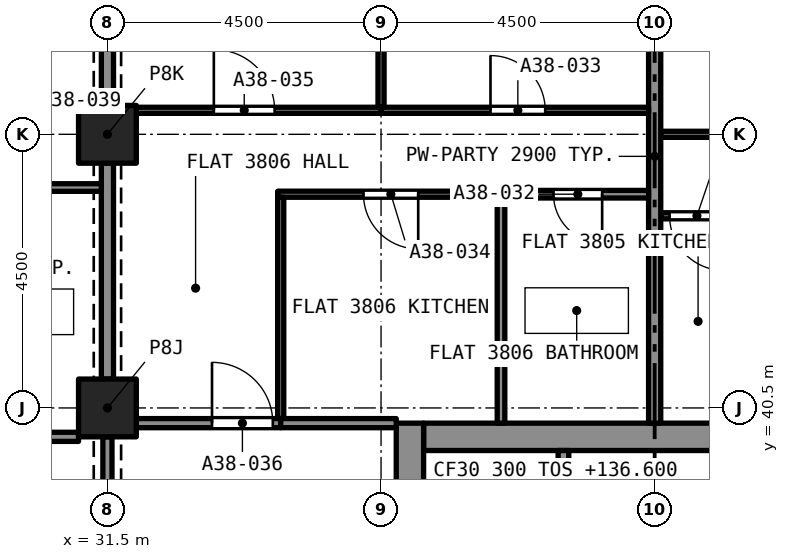
"""IFC4 building model, lengths in metres.
Left out: names, types, materials, properties, quantities, classifications, styles, units other than length and angle.
Written with IfcOpenShell. Run it as: python <this file> out.ifc"""

import sys

from ifc_helpers import new_model, si_unit, direction, frame, frame_2d, origin, origin_2d, place, context, subcontext, project, spatial, rectangle, extrude, element, fill, save


model = new_model("IFC4")
c1 = context("Model", 3, precision=1e-05, world=origin(), true_north=direction((0.0, 1.0)))
c2 = subcontext(c1, "Body", "Model", "MODEL_VIEW")
j1 = project(units=[si_unit("LENGTHUNIT", "METRE"), si_unit("PLANEANGLEUNIT", "RADIAN")], contexts=[c1])
p1 = place(None, origin())
s1 = spatial("IfcSite", under=j1, at=p1, CompositionType="ELEMENT")
p2 = place(p1, origin())
s2 = spatial("IfcBuilding", under=s1, at=p2, CompositionType="ELEMENT")
p3 = place(p2, frame((0.0, 0.0, 136.6)))
s3 = spatial("IfcBuildingStorey", under=s2, at=p3, CompositionType="ELEMENT", Elevation=136.6)
for number, where, z_axis, x_axis in (
    (1, (31.5, 40.5, 0.0), (0.0, 0.0, 1.0), (1.0, 0.0, 0.0)),
    (2, (31.5, 45.0, 0.0), (0.0, 0.0, 1.0), (1.0, 0.0, 0.0)),
):
    element("IfcColumn", number, at=place(p3, frame(where, z_axis=z_axis, x_axis=x_axis)), inside=s3, PredefinedType="COLUMN", context=c2, shape_type="SweptSolid", body=[
        extrude(rectangle(XDim=0.95, YDim=0.95, at=origin_2d()), origin(), (0.0, 0.0, 1.0), 3.2),
    ])
p4 = place(p3, frame((36.7, 40.025, 0.0), z_axis=(0.0, 0.0, 1.0), x_axis=(1.0, 0.0, 0.0)))
e3 = element("IfcWall", 3, at=p4, inside=s3, PredefinedType="SOLIDWALL", context=c2, shape_type="SweptSolid", body=[
    extrude(rectangle(XDim=7.6, YDim=0.45, at=frame_2d((3.8, 0.0))), origin(), (0.0, 0.0, 1.0), 3.2),
])
p5 = place(p3, frame((36.475, 27.25, 0.0), z_axis=(0.0, 0.0, 1.0), x_axis=(0.0, 1.0, 0.0)))
e4 = element("IfcWall", 4, at=p5, inside=s3, PredefinedType="SOLIDWALL", context=c2, shape_type="SweptSolid", body=[
    extrude(rectangle(XDim=13.0, YDim=0.45, at=frame_2d((6.5, 0.0))), origin(), (0.0, 0.0, 1.0), 3.2),
])
p6 = place(p5, frame((8.7, 0.0, 0.0)))
e5 = element("IfcOpeningElement", 5, at=p6, cuts=e4, PredefinedType="OPENING", context=c2, shape_type="SweptSolid", body=[
    extrude(rectangle(XDim=1.2, YDim=2.1, at=frame_2d((0.6, 1.05))), frame((0.0, 0.235, 0.0), z_axis=(0.0, -1.0, 0.0), x_axis=(1.0, 0.0, 0.0)), (0.0, 0.0, 1.0), 0.47),
])
p7 = place(p3, frame((40.6, 45.0, 0.0), z_axis=(0.0, 0.0, 1.0), x_axis=(1.0, 0.0, 0.0)))
e6 = element("IfcWall", 6, at=p7, inside=s3, PredefinedType="PARTITIONING", context=c2, shape_type="SweptSolid", body=[
    extrude(rectangle(XDim=4.4, YDim=0.1, at=frame_2d((2.2, 0.0))), origin(), (0.0, 0.0, 1.0), 2.9),
])
p8 = place(p7, frame((1.7, 0.0, 0.0)))
e7 = element("IfcOpeningElement", 7, at=p8, cuts=e6, PredefinedType="OPENING", context=c2, shape_type="SweptSolid", body=[
    extrude(rectangle(XDim=0.9, YDim=2.1, at=frame_2d((0.45, 1.05))), frame((0.0, 0.06, 0.0), z_axis=(0.0, -1.0, 0.0), x_axis=(1.0, 0.0, 0.0)), (0.0, 0.0, 1.0), 0.12),
])
p9 = place(p3, frame((41.891, 43.66, 0.0), z_axis=(0.0, 0.0, 1.0), x_axis=(-1.0, 0.0, 0.0)))
e8 = element("IfcWall", 8, at=p9, inside=s3, PredefinedType="PARTITIONING", context=c2, shape_type="SweptSolid", body=[
    extrude(rectangle(XDim=1.291, YDim=0.1, at=frame_2d((0.646, 0.0))), origin(), (0.0, 0.0, 1.0), 2.9),
])
p10 = place(p9, frame((0.246, 0.0, 0.0)))
e9 = element("IfcOpeningElement", 9, at=p10, cuts=e8, PredefinedType="OPENING", context=c2, shape_type="SweptSolid", body=[
    extrude(rectangle(XDim=0.9, YDim=2.1, at=frame_2d((0.45, 1.05))), frame((0.0, 0.06, 0.0), z_axis=(0.0, -1.0, 0.0), x_axis=(1.0, 0.0, 0.0)), (0.0, 0.0, 1.0), 0.12),
])
p11 = place(p3, frame((40.5, 40.25, 0.0), z_axis=(0.0, 0.0, 1.0), x_axis=(0.0, 1.0, 0.0)))
e10 = element("IfcWall", 10, at=p11, inside=s3, PredefinedType="PARTITIONING", context=c2, shape_type="SweptSolid", body=[
    extrude(rectangle(XDim=8.775, YDim=0.2, at=frame_2d((4.387, 0.0))), origin(), (0.0, 0.0, 1.0), 2.9),
])
p12 = place(p3, frame((40.4, 44.015, 0.0), z_axis=(0.0, 0.0, 1.0), x_axis=(-1.0, 0.0, 0.0)))
e11 = element("IfcWall", 11, at=p12, inside=s3, PredefinedType="PARTITIONING", context=c2, shape_type="SweptSolid", body=[
    extrude(rectangle(XDim=2.427, YDim=0.125, at=frame_2d((1.214, 0.0))), origin(), (0.0, 0.0, 1.0), 2.9),
])
p13 = place(p12, frame((0.764, 0.0, 0.0)))
e12 = element("IfcOpeningElement", 12, at=p13, cuts=e11, PredefinedType="OPENING", context=c2, shape_type="SweptSolid", body=[
    extrude(rectangle(XDim=0.8, YDim=2.1, at=frame_2d((0.4, 1.05))), frame((0.0, 0.073, 0.0), z_axis=(0.0, -1.0, 0.0), x_axis=(1.0, 0.0, 0.0)), (0.0, 0.0, 1.0), 0.145),
])
p14 = place(p3, frame((37.973, 40.25, 0.0), z_axis=(0.0, 0.0, 1.0), x_axis=(0.0, 1.0, 0.0)))
e13 = element("IfcWall", 13, at=p14, inside=s3, PredefinedType="PARTITIONING", context=c2, shape_type="SweptSolid", body=[
    extrude(rectangle(XDim=3.702, YDim=0.125, at=frame_2d((1.851, 0.0))), origin(), (0.0, 0.0, 1.0), 2.9),
])
p15 = place(p3, frame((36.0, 45.395, 0.0), z_axis=(0.0, 0.0, 1.0), x_axis=(1.0, 0.0, 0.0)))
e14 = element("IfcWall", 14, at=p15, inside=s3, PredefinedType="PARTITIONING", context=c2, shape_type="SweptSolid", body=[
    extrude(rectangle(XDim=4.4, YDim=0.1, at=frame_2d((2.2, 0.0))), origin(), (0.0, 0.0, 1.0), 2.9),
])
p16 = place(p15, frame((1.8, 0.0, 0.0)))
e15 = element("IfcOpeningElement", 15, at=p16, cuts=e14, PredefinedType="OPENING", context=c2, shape_type="SweptSolid", body=[
    extrude(rectangle(XDim=0.9, YDim=2.1, at=frame_2d((0.45, 1.05))), frame((0.0, 0.06, 0.0), z_axis=(0.0, -1.0, 0.0), x_axis=(1.0, 0.0, 0.0)), (0.0, 0.0, 1.0), 0.12),
])
p17 = place(p3, frame((36.0, 45.445, 0.0), z_axis=(0.0, 0.0, 1.0), x_axis=(0.0, 1.0, 0.0)))
e16 = element("IfcWall", 16, at=p17, inside=s3, PredefinedType="PARTITIONING", context=c2, shape_type="SweptSolid", body=[
    extrude(rectangle(XDim=3.58, YDim=0.1, at=frame_2d((1.79, 0.0))), origin(), (0.0, 0.0, 1.0), 2.9),
])
p18 = place(p3, frame((37.973, 44.015, 0.0), z_axis=(0.0, 0.0, 1.0), x_axis=(-1.0, 0.0, 0.0)))
e17 = element("IfcWall", 17, at=p18, inside=s3, PredefinedType="PARTITIONING", context=c2, shape_type="SweptSolid", body=[
    extrude(rectangle(XDim=3.673, YDim=0.1, at=frame_2d((1.836, 0.0))), origin(), (0.0, 0.0, 1.0), 2.9),
])
p19 = place(p18, frame((1.361, 0.0, 0.0)))
e18 = element("IfcOpeningElement", 18, at=p19, cuts=e17, PredefinedType="OPENING", context=c2, shape_type="SweptSolid", body=[
    extrude(rectangle(XDim=0.9, YDim=2.1, at=frame_2d((0.45, 1.05))), frame((0.0, 0.06, 0.0), z_axis=(0.0, -1.0, 0.0), x_axis=(1.0, 0.0, 0.0)), (0.0, 0.0, 1.0), 0.12),
])
p20 = place(p3, frame((34.35, 40.325, 0.0), z_axis=(0.0, 0.0, 1.0), x_axis=(0.0, 1.0, 0.0)))
e19 = element("IfcWall", 19, at=p20, inside=s3, PredefinedType="PARTITIONING", context=c2, shape_type="SweptSolid", body=[
    extrude(rectangle(XDim=3.64, YDim=0.1, at=frame_2d((1.82, 0.0))), origin(), (0.0, 0.0, 1.0), 2.9),
])
p21 = place(p3, frame((31.975, 45.395, 0.0), z_axis=(0.0, 0.0, 1.0), x_axis=(1.0, 0.0, 0.0)))
e20 = element("IfcWall", 20, at=p21, inside=s3, PredefinedType="PARTITIONING", context=c2, shape_type="SweptSolid", body=[
    extrude(rectangle(XDim=4.025, YDim=0.1, at=frame_2d((2.012, 0.0))), origin(), (0.0, 0.0, 1.0), 2.9),
])
p22 = place(p21, frame((1.275, 0.0, 0.0)))
e21 = element("IfcOpeningElement", 21, at=p22, cuts=e20, PredefinedType="OPENING", context=c2, shape_type="SweptSolid", body=[
    extrude(rectangle(XDim=1.0, YDim=2.1, at=frame_2d((0.5, 1.05))), frame((0.0, 0.06, 0.0), z_axis=(0.0, -1.0, 0.0), x_axis=(1.0, 0.0, 0.0)), (0.0, 0.0, 1.0), 0.12),
])
p23 = place(p3, frame((31.5, 40.975, 0.0), z_axis=(0.0, 0.0, 1.0), x_axis=(0.0, 1.0, 0.0)))
e22 = element("IfcWall", 22, at=p23, inside=s3, PredefinedType="PARTITIONING", context=c2, shape_type="SweptSolid", body=[
    extrude(rectangle(XDim=3.55, YDim=0.2, at=frame_2d((1.775, 0.0))), origin(), (0.0, 0.0, 1.0), 2.38),
])
p24 = place(p3, frame((31.975, 40.25, 0.0), z_axis=(0.0, 0.0, 1.0), x_axis=(1.0, 0.0, 0.0)))
e23 = element("IfcWall", 23, at=p24, inside=s3, PredefinedType="PARTITIONING", context=c2, shape_type="SweptSolid", body=[
    extrude(rectangle(XDim=2.375, YDim=0.15, at=frame_2d((1.188, 0.0))), origin(), (0.0, 0.0, 1.0), 2.9),
])
p25 = place(p24, frame((1.245, 0.0, 0.0)))
e24 = element("IfcOpeningElement", 24, at=p25, cuts=e23, PredefinedType="OPENING", context=c2, shape_type="SweptSolid", body=[
    extrude(rectangle(XDim=1.0, YDim=2.1, at=frame_2d((0.5, 1.05))), frame((0.0, 0.085, 0.0), z_axis=(0.0, -1.0, 0.0), x_axis=(1.0, 0.0, 0.0)), (0.0, 0.0, 1.0), 0.17),
])
p26 = place(p3, frame((34.35, 40.25, 0.0), z_axis=(0.0, 0.0, 1.0), x_axis=(1.0, 0.0, 0.0)))
e25 = element("IfcWall", 25, at=p26, inside=s3, PredefinedType="PARTITIONING", context=c2, shape_type="SweptSolid", body=[
    extrude(rectangle(XDim=1.9, YDim=0.15, at=frame_2d((0.95, 0.0))), origin(), (0.0, 0.0, 1.0), 2.9),
])
p27 = place(p3, frame((31.5, 45.495, 0.0), z_axis=(0.0, 0.0, 1.0), x_axis=(0.0, 1.0, 0.0)))
e26 = element("IfcWall", 26, at=p27, inside=s3, PredefinedType="PARTITIONING", context=c2, shape_type="SweptSolid", body=[
    extrude(rectangle(XDim=3.53, YDim=0.2, at=frame_2d((1.765, 0.0))), origin(), (0.0, 0.0, 1.0), 2.38),
])
p28 = place(p3, frame((31.4, 44.125, 0.0), z_axis=(0.0, 0.0, 1.0), x_axis=(-1.0, 0.0, 0.0)))
e27 = element("IfcWall", 27, at=p28, inside=s3, PredefinedType="PARTITIONING", context=c2, shape_type="SweptSolid", body=[
    extrude(rectangle(XDim=2.737, YDim=0.125, at=frame_2d((1.369, 0.0))), origin(), (0.0, 0.0, 1.0), 2.75),
])
p29 = place(p28, frame((0.887, 0.0, 0.0)))
e28 = element("IfcOpeningElement", 28, at=p29, cuts=e27, PredefinedType="OPENING", context=c2, shape_type="SweptSolid", body=[
    extrude(rectangle(XDim=0.8, YDim=2.1, at=frame_2d((0.4, 1.05))), frame((0.0, 0.073, 0.0), z_axis=(0.0, -1.0, 0.0), x_axis=(1.0, 0.0, 0.0)), (0.0, 0.0, 1.0), 0.145),
])
p30 = place(p3, frame((28.725, 40.025, 0.0), z_axis=(0.0, 0.0, 1.0), x_axis=(1.0, 0.0, 0.0)))
e29 = element("IfcWall", 29, at=p30, inside=s3, PredefinedType="PARTITIONING", context=c2, shape_type="SweptSolid", body=[
    extrude(rectangle(XDim=2.3, YDim=0.15, at=frame_2d((1.15, 0.0))), origin(), (0.0, 0.0, 1.0), 2.75),
])
p31 = place(p3, frame((27.0, 45.545, 0.0), z_axis=(0.0, 0.0, 1.0), x_axis=(1.0, 0.0, 0.0)))
e30 = element("IfcWall", 30, at=p31, inside=s3, PredefinedType="PARTITIONING", context=c2, shape_type="SweptSolid", body=[
    extrude(rectangle(XDim=4.4, YDim=0.1, at=frame_2d((2.2, 0.0))), origin(), (0.0, 0.0, 1.0), 2.75),
])
p32 = place(p31, frame((1.8, 0.0, 0.0)))
e31 = element("IfcOpeningElement", 31, at=p32, cuts=e30, PredefinedType="OPENING", context=c2, shape_type="SweptSolid", body=[
    extrude(rectangle(XDim=0.9, YDim=2.1, at=frame_2d((0.45, 1.05))), frame((0.0, 0.06, 0.0), z_axis=(0.0, -1.0, 0.0), x_axis=(1.0, 0.0, 0.0)), (0.0, 0.0, 1.0), 0.12),
])
p33 = place(p3, frame((31.5, 36.475, 0.0), z_axis=(0.0, 0.0, 1.0), x_axis=(0.0, 1.0, 0.0)))
e32 = element("IfcWall", 32, at=p33, inside=s3, PredefinedType="PARTITIONING", context=c2, shape_type="SweptSolid", body=[
    extrude(rectangle(XDim=3.55, YDim=0.15, at=frame_2d((1.775, 0.0))), origin(), (0.0, 0.0, 1.0), 2.38),
])
p34 = place(p33, frame((1.175, 0.0, 0.0)))
e33 = element("IfcOpeningElement", 33, at=p34, cuts=e32, PredefinedType="OPENING", context=c2, shape_type="SweptSolid", body=[
    extrude(rectangle(XDim=1.2, YDim=2.1, at=frame_2d((0.6, 1.05))), frame((0.0, 0.085, 0.0), z_axis=(0.0, -1.0, 0.0), x_axis=(1.0, 0.0, 0.0)), (0.0, 0.0, 1.0), 0.17),
])
p35 = place(p3, frame((39.0, 37.5, 0.0), z_axis=(0.0, 0.0, 1.0), x_axis=(0.0, 1.0, 0.0)))
e34 = element("IfcWall", 34, at=p35, inside=s3, PredefinedType="SOLIDWALL", context=c2, shape_type="SweptSolid", body=[
    extrude(rectangle(XDim=2.3, YDim=0.175, at=frame_2d((1.15, 0.0))), origin(), (0.0, 0.0, 1.0), 2.9),
])
p36 = place(p10, origin())
e35 = element("IfcDoor", 35, at=p36, inside=s3, OperationType="SINGLE_SWING_RIGHT", PredefinedType="DOOR", context=c2, shape_type="SweptSolid", body=[
    extrude(rectangle(XDim=0.9, YDim=2.1, at=frame_2d((0.45, 1.05))), frame((0.0, 0.025, 0.0), z_axis=(0.0, -1.0, 0.0), x_axis=(1.0, 0.0, 0.0)), (0.0, 0.0, 1.0), 0.05),
])
fill(e9, e35)
p37 = place(p13, origin())
e36 = element("IfcDoor", 36, at=p37, inside=s3, OperationType="SINGLE_SWING_LEFT", PredefinedType="DOOR", context=c2, shape_type="SweptSolid", body=[
    extrude(rectangle(XDim=0.8, YDim=2.1, at=frame_2d((0.4, 1.05))), frame((0.0, 0.025, 0.0), z_axis=(0.0, -1.0, 0.0), x_axis=(1.0, 0.0, 0.0)), (0.0, 0.0, 1.0), 0.05),
])
fill(e12, e36)
p38 = place(p16, origin())
e37 = element("IfcDoor", 37, at=p38, inside=s3, OperationType="SINGLE_SWING_RIGHT", PredefinedType="DOOR", context=c2, shape_type="SweptSolid", body=[
    extrude(rectangle(XDim=0.9, YDim=2.1, at=frame_2d((0.45, 1.05))), frame((0.0, 0.025, 0.0), z_axis=(0.0, -1.0, 0.0), x_axis=(1.0, 0.0, 0.0)), (0.0, 0.0, 1.0), 0.05),
])
fill(e15, e37)
p39 = place(p19, origin())
e38 = element("IfcDoor", 38, at=p39, inside=s3, OperationType="SINGLE_SWING_LEFT", PredefinedType="DOOR", context=c2, shape_type="SweptSolid", body=[
    extrude(rectangle(XDim=0.9, YDim=2.1, at=frame_2d((0.45, 1.05))), frame((0.0, 0.025, 0.0), z_axis=(0.0, -1.0, 0.0), x_axis=(1.0, 0.0, 0.0)), (0.0, 0.0, 1.0), 0.05),
])
fill(e18, e38)
p40 = place(p22, origin())
e39 = element("IfcDoor", 39, at=p40, inside=s3, OperationType="SINGLE_SWING_LEFT", PredefinedType="DOOR", context=c2, shape_type="SweptSolid", body=[
    extrude(rectangle(XDim=1.0, YDim=2.1, at=frame_2d((0.5, 1.05))), frame((0.0, 0.025, 0.0), z_axis=(0.0, -1.0, 0.0), x_axis=(1.0, 0.0, 0.0)), (0.0, 0.0, 1.0), 0.05),
])
fill(e21, e39)
p41 = place(p25, origin())
e40 = element("IfcDoor", 40, at=p41, inside=s3, OperationType="SINGLE_SWING_RIGHT", PredefinedType="DOOR", context=c2, shape_type="SweptSolid", body=[
    extrude(rectangle(XDim=1.0, YDim=2.1, at=frame_2d((0.5, 1.05))), frame((0.0, 0.025, 0.0), z_axis=(0.0, -1.0, 0.0), x_axis=(1.0, 0.0, 0.0)), (0.0, 0.0, 1.0), 0.05),
])
fill(e24, e40)
save(model, sys.argv[1])
